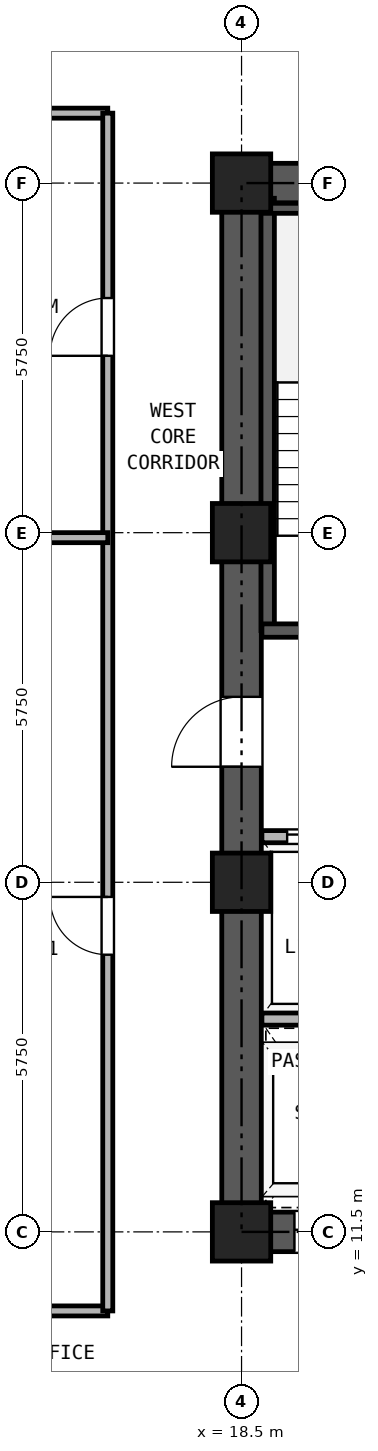
"""IFC4 building model, lengths in metres.
Left out: names, types, materials, properties, quantities, classifications, styles, units other than length and angle.
Written with IfcOpenShell. Run it as: python <this file> out.ifc"""

import sys

from ifc_helpers import new_model, si_unit, direction, frame, frame_2d, origin, origin_2d, place, context, subcontext, project, spatial, rectangle, hollow_rectangle, extrude, source, transform, mapped, element, fill, save


model = new_model("IFC4")
c1 = context("Model", 3, precision=1e-05, world=origin(), true_north=direction((0.0, 1.0)))
c2 = subcontext(c1, "Body", "Model", "MODEL_VIEW")
j1 = project(units=[si_unit("LENGTHUNIT", "METRE"), si_unit("PLANEANGLEUNIT", "RADIAN")], contexts=[c1])
p1 = place(None, origin())
s1 = spatial("IfcSite", under=j1, at=p1, CompositionType="ELEMENT")
p2 = place(p1, origin())
s2 = spatial("IfcBuilding", under=s1, at=p2, CompositionType="ELEMENT")
p3 = place(p2, frame((0.0, 0.0, 47.7)))
s3 = spatial("IfcBuildingStorey", under=s2, at=p3, CompositionType="ELEMENT", Elevation=47.7)
m1 = source(origin(), c2, "Body", "SweptSolid", [
    extrude(hollow_rectangle(XDim=0.96, YDim=0.96, WallThickness=0.06, at=origin_2d()), origin(), (0.0, 0.0, 1.0), 3.32),
])
for number, where, z_axis, x_axis in (
    (1, (18.5, 11.5, 0.0), (0.0, 0.0, 1.0), (1.0, 0.0, 0.0)),
    (2, (18.5, 17.25, 0.0), (0.0, 0.0, 1.0), (1.0, 0.0, 0.0)),
    (3, (18.5, 23.0, 0.0), (0.0, 0.0, 1.0), (1.0, 0.0, 0.0)),
    (4, (18.5, 28.75, 0.0), (0.0, 0.0, 1.0), (1.0, 0.0, 0.0)),
):
    element("IfcColumn", number, at=place(p3, frame(where, z_axis=z_axis, x_axis=x_axis)), inside=s3, PredefinedType="COLUMN", context=c2, shape_type="MappedRepresentation", body=[
        mapped(m1, transform((0.0, 0.0, 0.0), x_axis=(1.0, 0.0, 0.0), y_axis=(0.0, 1.0, 0.0), z_axis=(0.0, 0.0, 1.0), scale=1.0)),
    ])
p4 = place(p3, frame((18.175, 11.5, 0.0), z_axis=(0.0, 0.0, 1.0), x_axis=(1.0, 0.0, 0.0)))
e5 = element("IfcWall", 5, at=p4, inside=s3, PredefinedType="SHEAR", context=c2, shape_type="SweptSolid", body=[
    extrude(rectangle(XDim=10.65, YDim=0.65, at=frame_2d((5.325, 0.0))), origin(), (0.0, 0.0, 1.0), 3.32),
])
p5 = place(p4, frame((1.195, 0.0, 0.0)))
e6 = element("IfcOpeningElement", 6, at=p5, cuts=e5, PredefinedType="OPENING", context=c2, shape_type="SweptSolid", body=[
    extrude(rectangle(XDim=1.1, YDim=2.25, at=frame_2d((0.55, 1.125))), frame((0.0, 0.335, 0.0), z_axis=(0.0, -1.0, 0.0), x_axis=(1.0, 0.0, 0.0)), (0.0, 0.0, 1.0), 0.67),
])
p6 = place(p4, frame((3.495, 0.0, 0.0)))
e7 = element("IfcOpeningElement", 7, at=p6, cuts=e5, PredefinedType="OPENING", context=c2, shape_type="SweptSolid", body=[
    extrude(rectangle(XDim=1.1, YDim=2.25, at=frame_2d((0.55, 1.125))), frame((0.0, 0.335, 0.0), z_axis=(0.0, -1.0, 0.0), x_axis=(1.0, 0.0, 0.0)), (0.0, 0.0, 1.0), 0.67),
])
p7 = place(p4, frame((5.925, 0.0, 0.0)))
e8 = element("IfcOpeningElement", 8, at=p7, cuts=e5, PredefinedType="OPENING", context=c2, shape_type="SweptSolid", body=[
    extrude(rectangle(XDim=1.1, YDim=2.25, at=frame_2d((0.55, 1.125))), frame((0.0, 0.335, 0.0), z_axis=(0.0, -1.0, 0.0), x_axis=(1.0, 0.0, 0.0)), (0.0, 0.0, 1.0), 0.67),
])
p8 = place(p4, frame((8.325, 0.0, 0.0)))
e9 = element("IfcOpeningElement", 9, at=p8, cuts=e5, PredefinedType="OPENING", context=c2, shape_type="SweptSolid", body=[
    extrude(rectangle(XDim=1.1, YDim=2.25, at=frame_2d((0.55, 1.125))), frame((0.0, 0.335, 0.0), z_axis=(0.0, -1.0, 0.0), x_axis=(1.0, 0.0, 0.0)), (0.0, 0.0, 1.0), 0.67),
])
p9 = place(p3, frame((18.175, 28.75, 0.0), z_axis=(0.0, 0.0, 1.0), x_axis=(1.0, 0.0, 0.0)))
e10 = element("IfcWall", 10, at=p9, inside=s3, PredefinedType="SHEAR", context=c2, shape_type="SweptSolid", body=[
    extrude(rectangle(XDim=10.65, YDim=0.65, at=frame_2d((5.325, 0.0))), origin(), (0.0, 0.0, 1.0), 3.32),
])
p10 = place(p9, frame((4.205, 0.0, 0.0)))
e11 = element("IfcOpeningElement", 11, at=p10, cuts=e10, PredefinedType="OPENING", context=c2, shape_type="SweptSolid", body=[
    extrude(rectangle(XDim=0.9, YDim=2.05, at=frame_2d((0.45, 1.025))), frame((0.0, 0.335, 0.0), z_axis=(0.0, -1.0, 0.0), x_axis=(1.0, 0.0, 0.0)), (0.0, 0.0, 1.0), 0.67),
])
p11 = place(p9, frame((5.745, 0.0, 0.0)))
e12 = element("IfcOpeningElement", 12, at=p11, cuts=e10, PredefinedType="OPENING", context=c2, shape_type="SweptSolid", body=[
    extrude(rectangle(XDim=0.9, YDim=2.05, at=frame_2d((0.45, 1.025))), frame((0.0, 0.335, 0.0), z_axis=(0.0, -1.0, 0.0), x_axis=(1.0, 0.0, 0.0)), (0.0, 0.0, 1.0), 0.67),
])
p12 = place(p3, frame((18.5, 11.825, 0.0), z_axis=(0.0, 0.0, 1.0), x_axis=(0.0, 1.0, 0.0)))
e13 = element("IfcWall", 13, at=p12, inside=s3, PredefinedType="SHEAR", context=c2, shape_type="SweptSolid", body=[
    extrude(rectangle(XDim=16.6, YDim=0.65, at=frame_2d((8.3, 0.0))), origin(), (0.0, 0.0, 1.0), 3.32),
])
p13 = place(p12, frame((7.325, 0.0, 0.0)))
e14 = element("IfcOpeningElement", 14, at=p13, cuts=e13, PredefinedType="OPENING", context=c2, shape_type="SweptSolid", body=[
    extrude(rectangle(XDim=1.15, YDim=2.2, at=frame_2d((0.575, 1.1))), frame((0.0, 0.335, 0.0), z_axis=(0.0, -1.0, 0.0), x_axis=(1.0, 0.0, 0.0)), (0.0, 0.0, 1.0), 0.67),
])
p14 = place(p3, frame((18.93, 21.39, 0.0), z_axis=(0.0, 0.0, 1.0), x_axis=(0.0, 1.0, 0.0)))
e15 = element("IfcWall", 15, at=p14, inside=s3, PredefinedType="SOLIDWALL", context=c2, shape_type="SweptSolid", body=[
    extrude(rectangle(XDim=7.11, YDim=0.22, at=frame_2d((3.555, 0.0))), origin(), (0.0, 0.0, 1.0), 3.32),
])
p15 = place(p3, frame((18.835, 28.335, 0.0), z_axis=(0.0, 0.0, 1.0), x_axis=(1.0, 0.0, 0.0)))
e16 = element("IfcWall", 16, at=p15, inside=s3, PredefinedType="PARTITIONING", context=c2, shape_type="SweptSolid", body=[
    extrude(rectangle(XDim=3.275, YDim=0.165, at=frame_2d((1.638, 0.0))), origin(), (0.0, 0.0, 1.0), 3.32),
])
p16 = place(p3, frame((18.835, 21.39, 0.0), z_axis=(0.0, 0.0, 1.0), x_axis=(1.0, 0.0, 0.0)))
e17 = element("IfcWall", 17, at=p16, inside=s3, PredefinedType="SOLIDWALL", context=c2, shape_type="SweptSolid", body=[
    extrude(rectangle(XDim=6.295, YDim=0.22, at=frame_2d((3.147, 0.0))), origin(), (0.0, 0.0, 1.0), 3.32),
])
p17 = place(p16, frame((1.015, 0.0, 0.0)))
e18 = element("IfcOpeningElement", 18, at=p17, cuts=e17, PredefinedType="OPENING", context=c2, shape_type="SweptSolid", body=[
    extrude(rectangle(XDim=1.15, YDim=2.2, at=frame_2d((0.575, 1.1))), frame((0.0, 0.12, 0.0), z_axis=(0.0, -1.0, 0.0), x_axis=(1.0, 0.0, 0.0)), (0.0, 0.0, 1.0), 0.24),
])
p18 = place(p16, frame((4.745, 0.0, 0.0)))
e19 = element("IfcOpeningElement", 19, at=p18, cuts=e17, PredefinedType="OPENING", context=c2, shape_type="SweptSolid", body=[
    extrude(rectangle(XDim=1.1, YDim=2.25, at=frame_2d((0.55, 1.125))), frame((0.0, 0.12, 0.0), z_axis=(0.0, -1.0, 0.0), x_axis=(1.0, 0.0, 0.0)), (0.0, 0.0, 1.0), 0.24),
])
p19 = place(p3, frame((18.835, 18.0, 0.0), z_axis=(0.0, 0.0, 1.0), x_axis=(1.0, 0.0, 0.0)))
e20 = element("IfcWall", 20, at=p19, inside=s3, PredefinedType="PARTITIONING", context=c2, shape_type="SweptSolid", body=[
    extrude(rectangle(XDim=9.33, YDim=0.2, at=frame_2d((4.665, 0.0))), origin(), (0.0, 0.0, 1.0), 3.32),
])
p20 = place(p19, frame((0.415, 0.0, 0.0)))
e21 = element("IfcOpeningElement", 21, at=p20, cuts=e20, PredefinedType="OPENING", context=c2, shape_type="SweptSolid", body=[
    extrude(rectangle(XDim=1.3, YDim=2.3, at=frame_2d((0.65, 1.15))), frame((0.0, 0.11, 0.0), z_axis=(0.0, -1.0, 0.0), x_axis=(1.0, 0.0, 0.0)), (0.0, 0.0, 1.0), 0.22),
])
p21 = place(p19, frame((2.515, 0.0, 0.0)))
e22 = element("IfcOpeningElement", 22, at=p21, cuts=e20, PredefinedType="OPENING", context=c2, shape_type="SweptSolid", body=[
    extrude(rectangle(XDim=1.3, YDim=2.3, at=frame_2d((0.65, 1.15))), frame((0.0, 0.11, 0.0), z_axis=(0.0, -1.0, 0.0), x_axis=(1.0, 0.0, 0.0)), (0.0, 0.0, 1.0), 0.22),
])
p22 = place(p19, frame((4.935, 0.0, 0.0)))
e23 = element("IfcOpeningElement", 23, at=p22, cuts=e20, PredefinedType="OPENING", context=c2, shape_type="SweptSolid", body=[
    extrude(rectangle(XDim=0.9, YDim=2.05, at=frame_2d((0.45, 1.025))), frame((0.0, 0.11, 0.0), z_axis=(0.0, -1.0, 0.0), x_axis=(1.0, 0.0, 0.0)), (0.0, 0.0, 1.0), 0.22),
])
p23 = place(p19, frame((8.065, 0.0, 0.0)))
e24 = element("IfcOpeningElement", 24, at=p23, cuts=e20, PredefinedType="OPENING", context=c2, shape_type="SweptSolid", body=[
    extrude(rectangle(XDim=0.9, YDim=2.05, at=frame_2d((0.45, 1.025))), frame((0.0, 0.11, 0.0), z_axis=(0.0, -1.0, 0.0), x_axis=(1.0, 0.0, 0.0)), (0.0, 0.0, 1.0), 0.22),
])
p24 = place(p3, frame((18.835, 15.0, 0.0), z_axis=(0.0, 0.0, 1.0), x_axis=(1.0, 0.0, 0.0)))
e25 = element("IfcWall", 25, at=p24, inside=s3, PredefinedType="PARTITIONING", context=c2, shape_type="SweptSolid", body=[
    extrude(rectangle(XDim=9.33, YDim=0.2, at=frame_2d((4.665, 0.0))), origin(), (0.0, 0.0, 1.0), 3.32),
])
for number, where, z_axis, x_axis in (
    (26, (10.6, 10.2, 0.0), (0.0, 0.0, 1.0), (1.0, 0.0, 0.0)),
    (27, (10.6, 29.9, 0.0), (0.0, 0.0, 1.0), (1.0, 0.0, 0.0)),
):
    element("IfcWall", number, at=place(p3, frame(where, z_axis=z_axis, x_axis=x_axis)), inside=s3, PredefinedType="PARTITIONING", context=c2, shape_type="SweptSolid", body=[
        extrude(rectangle(XDim=5.7, YDim=0.165, at=frame_2d((2.85, 0.0))), origin(), (0.0, 0.0, 1.0), 3.32),
    ])
p25 = place(p3, frame((16.3, 10.2, 0.0), z_axis=(0.0, 0.0, 1.0), x_axis=(0.0, 1.0, 0.0)))
e28 = element("IfcWall", 28, at=p25, inside=s3, PredefinedType="PARTITIONING", context=c2, shape_type="SweptSolid", body=[
    extrude(rectangle(XDim=19.7, YDim=0.165, at=frame_2d((9.85, 0.0))), origin(), (0.0, 0.0, 1.0), 3.32),
])
p26 = place(p25, frame((5.859, 0.0, 0.0)))
e29 = element("IfcOpeningElement", 29, at=p26, cuts=e28, PredefinedType="OPENING", context=c2, shape_type="SweptSolid", body=[
    extrude(rectangle(XDim=0.95, YDim=2.15, at=frame_2d((0.475, 1.075))), frame((0.0, 0.093, 0.0), z_axis=(0.0, -1.0, 0.0), x_axis=(1.0, 0.0, 0.0)), (0.0, 0.0, 1.0), 0.185),
])
p27 = place(p25, frame((15.709, 0.0, 0.0)))
e30 = element("IfcOpeningElement", 30, at=p27, cuts=e28, PredefinedType="OPENING", context=c2, shape_type="SweptSolid", body=[
    extrude(rectangle(XDim=0.95, YDim=2.15, at=frame_2d((0.475, 1.075))), frame((0.0, 0.093, 0.0), z_axis=(0.0, -1.0, 0.0), x_axis=(1.0, 0.0, 0.0)), (0.0, 0.0, 1.0), 0.185),
])
p28 = place(p3, frame((10.6, 22.918, 0.0), z_axis=(0.0, 0.0, 1.0), x_axis=(1.0, 0.0, 0.0)))
e31 = element("IfcWall", 31, at=p28, inside=s3, PredefinedType="PARTITIONING", context=c2, shape_type="SweptSolid", body=[
    extrude(rectangle(XDim=5.7, YDim=0.165, at=frame_2d((2.85, 0.0))), origin(), (0.0, 0.0, 1.0), 2.539),
])
p29 = place(p20, origin())
e32 = element("IfcDoor", 32, at=p29, inside=s3, OperationType="DOUBLE_DOOR_SLIDING", PredefinedType="DOOR", context=c2, shape_type="SweptSolid", body=[
    extrude(rectangle(XDim=1.3, YDim=2.3, at=frame_2d((0.65, 1.15))), frame((0.0, 0.025, 0.0), z_axis=(0.0, -1.0, 0.0), x_axis=(1.0, 0.0, 0.0)), (0.0, 0.0, 1.0), 0.05),
])
fill(e21, e32)
p30 = place(p13, frame((1.15, 0.0, 0.0), z_axis=(0.0, 0.0, 1.0), x_axis=(-1.0, 0.0, 0.0)))
e33 = element("IfcDoor", 33, at=p30, inside=s3, OperationType="SINGLE_SWING_LEFT", PredefinedType="DOOR", context=c2, shape_type="SweptSolid", body=[
    extrude(rectangle(XDim=1.15, YDim=2.2, at=frame_2d((0.575, 1.1))), frame((0.0, 0.025, 0.0), z_axis=(0.0, -1.0, 0.0), x_axis=(1.0, 0.0, 0.0)), (0.0, 0.0, 1.0), 0.05),
])
fill(e14, e33)
p31 = place(p5, frame((1.1, 0.0, 0.0), z_axis=(0.0, 0.0, 1.0), x_axis=(-1.0, 0.0, 0.0)))
e34 = element("IfcDoor", 34, at=p31, inside=s3, OperationType="DOUBLE_DOOR_SLIDING", PredefinedType="DOOR", context=c2, shape_type="SweptSolid", body=[
    extrude(rectangle(XDim=1.1, YDim=2.25, at=frame_2d((0.55, 1.125))), frame((0.0, 0.025, 0.0), z_axis=(0.0, -1.0, 0.0), x_axis=(1.0, 0.0, 0.0)), (0.0, 0.0, 1.0), 0.05),
])
fill(e6, e34)
p32 = place(p26, frame((0.95, 0.0, 0.0), z_axis=(0.0, 0.0, 1.0), x_axis=(-1.0, 0.0, 0.0)))
e35 = element("IfcDoor", 35, at=p32, inside=s3, OperationType="SINGLE_SWING_RIGHT", PredefinedType="DOOR", context=c2, shape_type="SweptSolid", body=[
    extrude(rectangle(XDim=0.95, YDim=2.15, at=frame_2d((0.475, 1.075))), frame((0.0, 0.025, 0.0), z_axis=(0.0, -1.0, 0.0), x_axis=(1.0, 0.0, 0.0)), (0.0, 0.0, 1.0), 0.05),
])
fill(e29, e35)
p33 = place(p27, frame((0.95, 0.0, 0.0), z_axis=(0.0, 0.0, 1.0), x_axis=(-1.0, 0.0, 0.0)))
e36 = element("IfcDoor", 36, at=p33, inside=s3, OperationType="SINGLE_SWING_LEFT", PredefinedType="DOOR", context=c2, shape_type="SweptSolid", body=[
    extrude(rectangle(XDim=0.95, YDim=2.15, at=frame_2d((0.475, 1.075))), frame((0.0, 0.025, 0.0), z_axis=(0.0, -1.0, 0.0), x_axis=(1.0, 0.0, 0.0)), (0.0, 0.0, 1.0), 0.05),
])
fill(e30, e36)
save(model, sys.argv[1])
